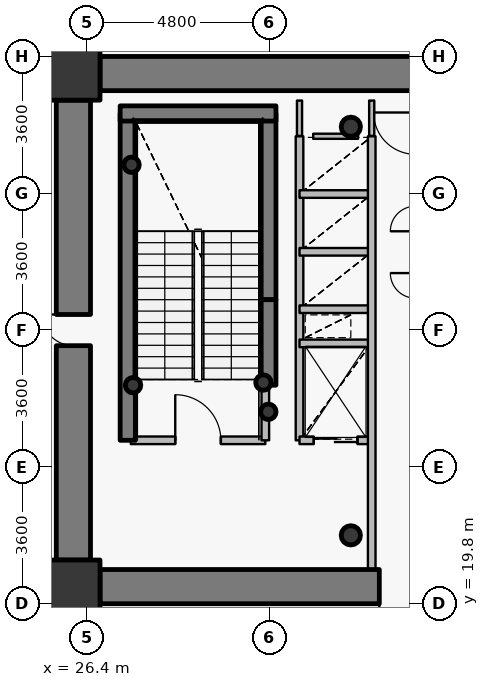
"""IFC4 building model, lengths in metres.
Left out: names, types, materials, properties, quantities, classifications, styles, units other than length and angle.
Written with IfcOpenShell. Run it as: python <this file> out.ifc"""

import sys

from ifc_helpers import new_model, si_unit, direction, frame, frame_2d, origin, origin_2d, place, context, subcontext, project, spatial, rectangle, hollow_circle, extrude, source, transform, mapped, element, fill, save


model = new_model("IFC4")
c1 = context("Model", 3, precision=1e-05, world=origin(), true_north=direction((0.0, 1.0)))
c2 = subcontext(c1, "Body", "Model", "MODEL_VIEW")
j1 = project(units=[si_unit("LENGTHUNIT", "METRE"), si_unit("PLANEANGLEUNIT", "RADIAN")], contexts=[c1])
p1 = place(None, origin())
s1 = spatial("IfcSite", under=j1, at=p1, CompositionType="ELEMENT")
p2 = place(p1, origin())
s2 = spatial("IfcBuilding", under=s1, at=p2, CompositionType="ELEMENT")
p3 = place(p2, frame((0.0, 0.0, 66.0)))
s3 = spatial("IfcBuildingStorey", under=s2, at=p3, CompositionType="ELEMENT", Elevation=66.0)
for number, where, z_axis, x_axis in (
    (1, (26.05, 20.25, 0.0), (0.0, 0.0, 1.0), (1.0, 0.0, 0.0)),
    (2, (26.05, 33.75, 0.0), (0.0, 0.0, 1.0), (1.0, 0.0, 0.0)),
):
    element("IfcColumn", number, at=place(p3, frame(where, z_axis=z_axis, x_axis=x_axis)), inside=s3, PredefinedType="COLUMN", context=c2, shape_type="SweptSolid", body=[
        extrude(rectangle(XDim=1.4, YDim=1.4, at=origin_2d()), origin(), (0.0, 0.0, 1.0), 4.2),
    ])
for number, where, z_axis, x_axis in (
    (3, (33.35, 21.6, 0.0), (0.0, 0.0, 1.0), (1.0, 0.0, 0.0)),
    (4, (33.35, 32.35, 0.0), (0.0, 0.0, 1.0), (1.0, 0.0, 0.0)),
):
    element("IfcColumn", number, at=place(p3, frame(where, z_axis=z_axis, x_axis=x_axis)), inside=s3, PredefinedType="COLUMN", context=c2, shape_type="SweptSolid", body=[
        extrude(hollow_circle(Radius=0.254, WallThickness=0.02, at=origin_2d()), origin(), (0.0, 0.0, 1.0), 4.2),
    ])
p4 = place(p3, frame((27.48, 24.1, 0.0), z_axis=(0.0, 0.0, 1.0), x_axis=(0.0, 1.0, 0.0)))
e5 = element("IfcWall", 5, at=p4, inside=s3, PredefinedType="SHEAR", context=c2, shape_type="SweptSolid", body=[
    extrude(rectangle(XDim=8.6, YDim=0.4, at=frame_2d((4.3, 0.0))), origin(), (0.0, 0.0, 1.0), 4.2),
])
p5 = place(p3, frame((31.18, 27.8, 0.0), z_axis=(0.0, 0.0, 1.0), x_axis=(0.0, 1.0, 0.0)))
e6 = element("IfcWall", 6, at=p5, inside=s3, PredefinedType="SHEAR", context=c2, shape_type="SweptSolid", body=[
    extrude(rectangle(XDim=4.9, YDim=0.4, at=frame_2d((2.45, 0.0))), origin(), (0.0, 0.0, 1.0), 4.2),
])
p6 = place(p3, frame((27.28, 32.7, 0.0), z_axis=(0.0, 0.0, 1.0), x_axis=(1.0, 0.0, 0.0)))
e7 = element("IfcWall", 7, at=p6, inside=s3, PredefinedType="SHEAR", context=c2, shape_type="SweptSolid", body=[
    extrude(rectangle(XDim=4.1, YDim=0.4, at=frame_2d((2.05, 0.0))), origin(), (0.0, 0.0, 1.0), 4.2),
])
for number, where, z_axis, x_axis in (
    (8, (27.58, 31.35, 0.0), (0.0, 0.0, 1.0), (1.0, 0.0, 0.0)),
    (9, (31.05, 25.62, 0.0), (0.0, 0.0, 1.0), (1.0, 0.0, 0.0)),
    (10, (31.18, 24.85, 0.0), (0.0, 0.0, 1.0), (1.0, 0.0, 0.0)),
    (11, (27.62, 25.55, 0.0), (0.0, 0.0, 1.0), (1.0, 0.0, 0.0)),
):
    element("IfcColumn", number, at=place(p3, frame(where, z_axis=z_axis, x_axis=x_axis)), inside=s3, PredefinedType="COLUMN", context=c2, shape_type="SweptSolid", body=[
        extrude(hollow_circle(Radius=0.203, WallThickness=0.016, at=origin_2d()), origin(), (0.0, 0.0, 1.0), 4.2),
    ])
p7 = place(p3, frame((26.75, 33.75, 0.0), z_axis=(0.0, 0.0, 1.0), x_axis=(1.0, 0.0, 0.0)))
e12 = element("IfcWall", 12, at=p7, inside=s3, PredefinedType="SHEAR", context=c2, shape_type="SweptSolid", body=[
    extrude(rectangle(XDim=18.5, YDim=0.9, at=frame_2d((9.25, 0.0))), origin(), (0.0, 0.0, 1.0), 3.4),
])
p8 = place(p3, frame((45.25, 20.25, 0.0), z_axis=(0.0, 0.0, 1.0), x_axis=(-1.0, 0.0, 0.0)))
e13 = element("IfcWall", 13, at=p8, inside=s3, PredefinedType="SHEAR", context=c2, shape_type="SweptSolid", body=[
    extrude(rectangle(XDim=18.5, YDim=0.9, at=frame_2d((9.25, 0.0))), origin(), (0.0, 0.0, 1.0), 3.4),
])
p9 = place(p8, frame((10.0, 0.0, 0.0)))
e14 = element("IfcOpeningElement", 14, at=p9, cuts=e13, PredefinedType="OPENING", context=c2, shape_type="SweptSolid", body=[
    extrude(rectangle(XDim=1.15, YDim=2.15, at=origin_2d()), frame((0.575, 0.46, 1.075), z_axis=(0.0, -1.0, 0.0), x_axis=(1.0, 0.0, 0.0)), (0.0, 0.0, 1.0), 0.92),
])
p10 = place(p3, frame((26.05, 20.95, 0.0), z_axis=(0.0, 0.0, 1.0), x_axis=(0.0, 1.0, 0.0)))
e15 = element("IfcWall", 15, at=p10, inside=s3, PredefinedType="SHEAR", context=c2, shape_type="SweptSolid", body=[
    extrude(rectangle(XDim=12.1, YDim=0.9, at=frame_2d((6.05, 0.0))), origin(), (0.0, 0.0, 1.0), 3.4),
])
p11 = place(p10, frame((5.64, 0.0, 0.0)))
e16 = element("IfcOpeningElement", 16, at=p11, cuts=e15, PredefinedType="OPENING", context=c2, shape_type="SweptSolid", body=[
    extrude(rectangle(XDim=0.82, YDim=2.1, at=origin_2d()), frame((0.41, 0.46, 1.05), z_axis=(0.0, -1.0, 0.0), x_axis=(1.0, 0.0, 0.0)), (0.0, 0.0, 1.0), 0.92),
])
p12 = place(p3, frame((31.18, 25.55, 0.0), z_axis=(0.0, 0.0, 1.0), x_axis=(0.0, 1.0, 0.0)))
e17 = element("IfcWall", 17, at=p12, inside=s3, PredefinedType="SHEAR", context=c2, shape_type="SweptSolid", body=[
    extrude(rectangle(XDim=2.25, YDim=0.4, at=frame_2d((1.125, 0.0))), origin(), (0.0, 0.0, 1.0), 3.55),
])
p13 = place(p3, frame((27.56, 24.1, 0.0), z_axis=(0.0, 0.0, 1.0), x_axis=(1.0, 0.0, 0.0)))
e18 = element("IfcWall", 18, at=p13, inside=s3, PredefinedType="PARTITIONING", context=c2, shape_type="SweptSolid", body=[
    extrude(rectangle(XDim=3.54, YDim=0.2, at=frame_2d((1.77, 0.0))), origin(), (0.0, 0.0, 1.0), 3.95),
])
p14 = place(p13, frame((1.17, 0.0, 0.0)))
e19 = element("IfcOpeningElement", 19, at=p14, cuts=e18, PredefinedType="OPENING", context=c2, shape_type="SweptSolid", body=[
    extrude(rectangle(XDim=1.2, YDim=2.15, at=origin_2d()), frame((0.6, 0.11, 1.075), z_axis=(0.0, -1.0, 0.0), x_axis=(1.0, 0.0, 0.0)), (0.0, 0.0, 1.0), 0.22),
])
p15 = place(p3, frame((31.1, 24.1, 0.0), z_axis=(0.0, 0.0, 1.0), x_axis=(0.0, 1.0, 0.0)))
e20 = element("IfcWall", 20, at=p15, inside=s3, PredefinedType="PARTITIONING", context=c2, shape_type="SweptSolid", body=[
    extrude(rectangle(XDim=1.44, YDim=0.2, at=frame_2d((0.72, 0.0))), origin(), (0.0, 0.0, 1.0), 3.95),
])
p16 = place(p3, frame((32.0, 24.1, 0.0), z_axis=(0.0, 0.0, 1.0), x_axis=(0.0, 1.0, 0.0)))
e21 = element("IfcWall", 21, at=p16, inside=s3, PredefinedType="PARTITIONING", context=c2, shape_type="SweptSolid", body=[
    extrude(rectangle(XDim=8.0, YDim=0.2, at=frame_2d((4.0, 0.0))), origin(), (0.0, 0.0, 1.0), 3.95),
])
p17 = place(p3, frame((32.0, 24.1, 0.0), z_axis=(0.0, 0.0, 1.0), x_axis=(1.0, 0.0, 0.0)))
e22 = element("IfcWall", 22, at=p17, inside=s3, PredefinedType="PARTITIONING", context=c2, shape_type="SweptSolid", body=[
    extrude(rectangle(XDim=1.9, YDim=0.2, at=frame_2d((0.95, 0.0))), origin(), (0.0, 0.0, 1.0), 3.535),
])
p18 = place(p17, frame((0.375, 0.0, 0.0)))
e23 = element("IfcOpeningElement", 23, at=p18, cuts=e22, PredefinedType="OPENING", context=c2, shape_type="SweptSolid", body=[
    extrude(rectangle(XDim=1.15, YDim=2.15, at=origin_2d()), frame((0.575, 0.11, 1.075), z_axis=(0.0, -1.0, 0.0), x_axis=(1.0, 0.0, 0.0)), (0.0, 0.0, 1.0), 0.22),
])
for number, where, z_axis, x_axis in (
    (24, (32.0, 26.65, 0.0), (0.0, 0.0, 1.0), (1.0, 0.0, 0.0)),
    (25, (32.0, 27.55, 0.0), (0.0, 0.0, 1.0), (1.0, 0.0, 0.0)),
    (26, (32.0, 29.06, 0.0), (0.0, 0.0, 1.0), (1.0, 0.0, 0.0)),
    (27, (32.0, 30.58, 0.0), (0.0, 0.0, 1.0), (1.0, 0.0, 0.0)),
):
    element("IfcWall", number, at=place(p3, frame(where, z_axis=z_axis, x_axis=x_axis)), inside=s3, PredefinedType="PARTITIONING", context=c2, shape_type="SweptSolid", body=[
        extrude(rectangle(XDim=1.9, YDim=0.2, at=frame_2d((0.95, 0.0))), origin(), (0.0, 0.0, 1.0), 3.535),
    ])
p19 = place(p3, frame((33.9, 20.7, 0.0), z_axis=(0.0, 0.0, 1.0), x_axis=(0.0, 1.0, 0.0)))
e28 = element("IfcWall", 28, at=p19, inside=s3, PredefinedType="PARTITIONING", context=c2, shape_type="SweptSolid", body=[
    extrude(rectangle(XDim=11.4, YDim=0.2, at=frame_2d((5.7, 0.0))), origin(), (0.0, 0.0, 1.0), 3.535),
])
p20 = place(p3, frame((32.36, 32.1, 0.0), z_axis=(0.0, 0.0, 1.0), x_axis=(1.0, 0.0, 0.0)))
e29 = element("IfcWall", 29, at=p20, inside=s3, PredefinedType="PARTITIONING", context=c2, shape_type="SweptSolid", body=[
    extrude(rectangle(XDim=1.18, YDim=0.135, at=frame_2d((0.59, 0.0))), origin(), (0.0, 0.0, 1.0), 3.535),
])
p21 = place(p3, frame((32.0, 33.04, 0.0), z_axis=(0.0, 0.0, 1.0), x_axis=(0.0, -1.0, 0.0)))
e30 = element("IfcWall", 30, at=p21, inside=s3, PredefinedType="PARTITIONING", context=c2, shape_type="SweptSolid", body=[
    extrude(rectangle(XDim=0.93, YDim=0.135, at=frame_2d((0.465, 0.0))), origin(), (0.0, 0.0, 1.0), 3.485),
])
p22 = place(p3, frame((33.9, 32.11, 0.0), z_axis=(0.0, 0.0, 1.0), x_axis=(0.0, 1.0, 0.0)))
e31 = element("IfcWall", 31, at=p22, inside=s3, PredefinedType="PARTITIONING", context=c2, shape_type="SweptSolid", body=[
    extrude(rectangle(XDim=0.93, YDim=0.135, at=frame_2d((0.465, 0.0))), origin(), (0.0, 0.0, 1.0), 3.535),
])
p23 = place(p3, frame((26.74, 34.2, 0.0), z_axis=(0.0, 0.0, 1.0), x_axis=(-1.0, 0.0, 0.0)))
e32 = element("IfcWall", 32, at=p23, inside=s3, PredefinedType="PARTITIONING", context=c2, shape_type="SweptSolid", body=[
    extrude(rectangle(XDim=1.14, YDim=0.135, at=frame_2d((0.57, 0.0))), origin(), (0.0, 0.0, 1.0), 3.285),
])
p24 = place(p3, frame((25.6, 33.893, 0.0), z_axis=(0.0, 0.0, 1.0), x_axis=(0.0, -1.0, 0.0)))
e33 = element("IfcWall", 33, at=p24, inside=s3, PredefinedType="PARTITIONING", context=c2, shape_type="SweptSolid", body=[
    extrude(rectangle(XDim=0.833, YDim=0.135, at=frame_2d((0.416, 0.0))), origin(), (0.0, 0.0, 1.0), 3.95),
])
p25 = place(p3, frame((25.6, 20.94, 0.0), z_axis=(0.0, 0.0, 1.0), x_axis=(0.0, -1.0, 0.0)))
e34 = element("IfcWall", 34, at=p25, inside=s3, PredefinedType="PARTITIONING", context=c2, shape_type="SweptSolid", body=[
    extrude(rectangle(XDim=1.14, YDim=0.135, at=frame_2d((0.57, 0.0))), origin(), (0.0, 0.0, 1.0), 3.95),
])
p26 = place(p3, frame((25.907, 19.8, 0.0), z_axis=(0.0, 0.0, 1.0), x_axis=(1.0, 0.0, 0.0)))
e35 = element("IfcWall", 35, at=p26, inside=s3, PredefinedType="PARTITIONING", context=c2, shape_type="SweptSolid", body=[
    extrude(rectangle(XDim=0.833, YDim=0.135, at=frame_2d((0.416, 0.0))), origin(), (0.0, 0.0, 1.0), 3.285),
])
m1 = source(origin(), c2, "Body", "SweptSolid", [
    extrude(rectangle(XDim=0.82, YDim=2.1, at=origin_2d()), frame((0.41, 0.025, 1.05), z_axis=(0.0, -1.0, 0.0), x_axis=(1.0, 0.0, 0.0)), (0.0, 0.0, 1.0), 0.05),
])
p27 = place(p11, origin())
e36 = element("IfcDoor", 36, at=p27, inside=s3, OperationType="SINGLE_SWING_RIGHT", PredefinedType="DOOR", context=c2, shape_type="MappedRepresentation", body=[
    mapped(m1, transform((0.0, 0.0, 0.0), x_axis=(1.0, 0.0, 0.0), y_axis=(0.0, 1.0, 0.0), z_axis=(0.0, 0.0, 1.0), scale=1.0)),
])
fill(e16, e36)
m2 = source(origin(), c2, "Body", "SweptSolid", [
    extrude(rectangle(XDim=1.15, YDim=2.15, at=origin_2d()), frame((0.575, 0.025, 1.075), z_axis=(0.0, -1.0, 0.0), x_axis=(1.0, 0.0, 0.0)), (0.0, 0.0, 1.0), 0.05),
])
p28 = place(p9, origin())
e37 = element("IfcDoor", 37, at=p28, inside=s3, OperationType="SINGLE_SWING_RIGHT", PredefinedType="DOOR", context=c2, shape_type="MappedRepresentation", body=[
    mapped(m2, transform((0.0, 0.0, 0.0), x_axis=(1.0, 0.0, 0.0), y_axis=(0.0, 1.0, 0.0), z_axis=(0.0, 0.0, 1.0), scale=1.0)),
])
fill(e14, e37)
m3 = source(origin(), c2, "Body", "SweptSolid", [
    extrude(rectangle(XDim=1.2, YDim=2.15, at=origin_2d()), frame((0.6, 0.025, 1.075), z_axis=(0.0, -1.0, 0.0), x_axis=(1.0, 0.0, 0.0)), (0.0, 0.0, 1.0), 0.05),
])
p29 = place(p14, origin())
e38 = element("IfcDoor", 38, at=p29, inside=s3, OperationType="SINGLE_SWING_LEFT", PredefinedType="DOOR", context=c2, shape_type="MappedRepresentation", body=[
    mapped(m3, transform((0.0, 0.0, 0.0), x_axis=(1.0, 0.0, 0.0), y_axis=(0.0, 1.0, 0.0), z_axis=(0.0, 0.0, 1.0), scale=1.0)),
])
fill(e19, e38)
m4 = source(origin(), c2, "Body", "SweptSolid", [
    extrude(rectangle(XDim=1.15, YDim=2.15, at=origin_2d()), frame((0.575, 0.025, 1.075), z_axis=(0.0, -1.0, 0.0), x_axis=(1.0, 0.0, 0.0)), (0.0, 0.0, 1.0), 0.05),
])
p30 = place(p18, origin())
e39 = element("IfcDoor", 39, at=p30, inside=s3, OperationType="DOUBLE_DOOR_SLIDING", PredefinedType="USERDEFINED", context=c2, shape_type="MappedRepresentation", body=[
    mapped(m4, transform((0.0, 0.0, 0.0), x_axis=(1.0, 0.0, 0.0), y_axis=(0.0, 1.0, 0.0), z_axis=(0.0, 0.0, 1.0), scale=1.0)),
])
fill(e23, e39)
save(model, sys.argv[1])
